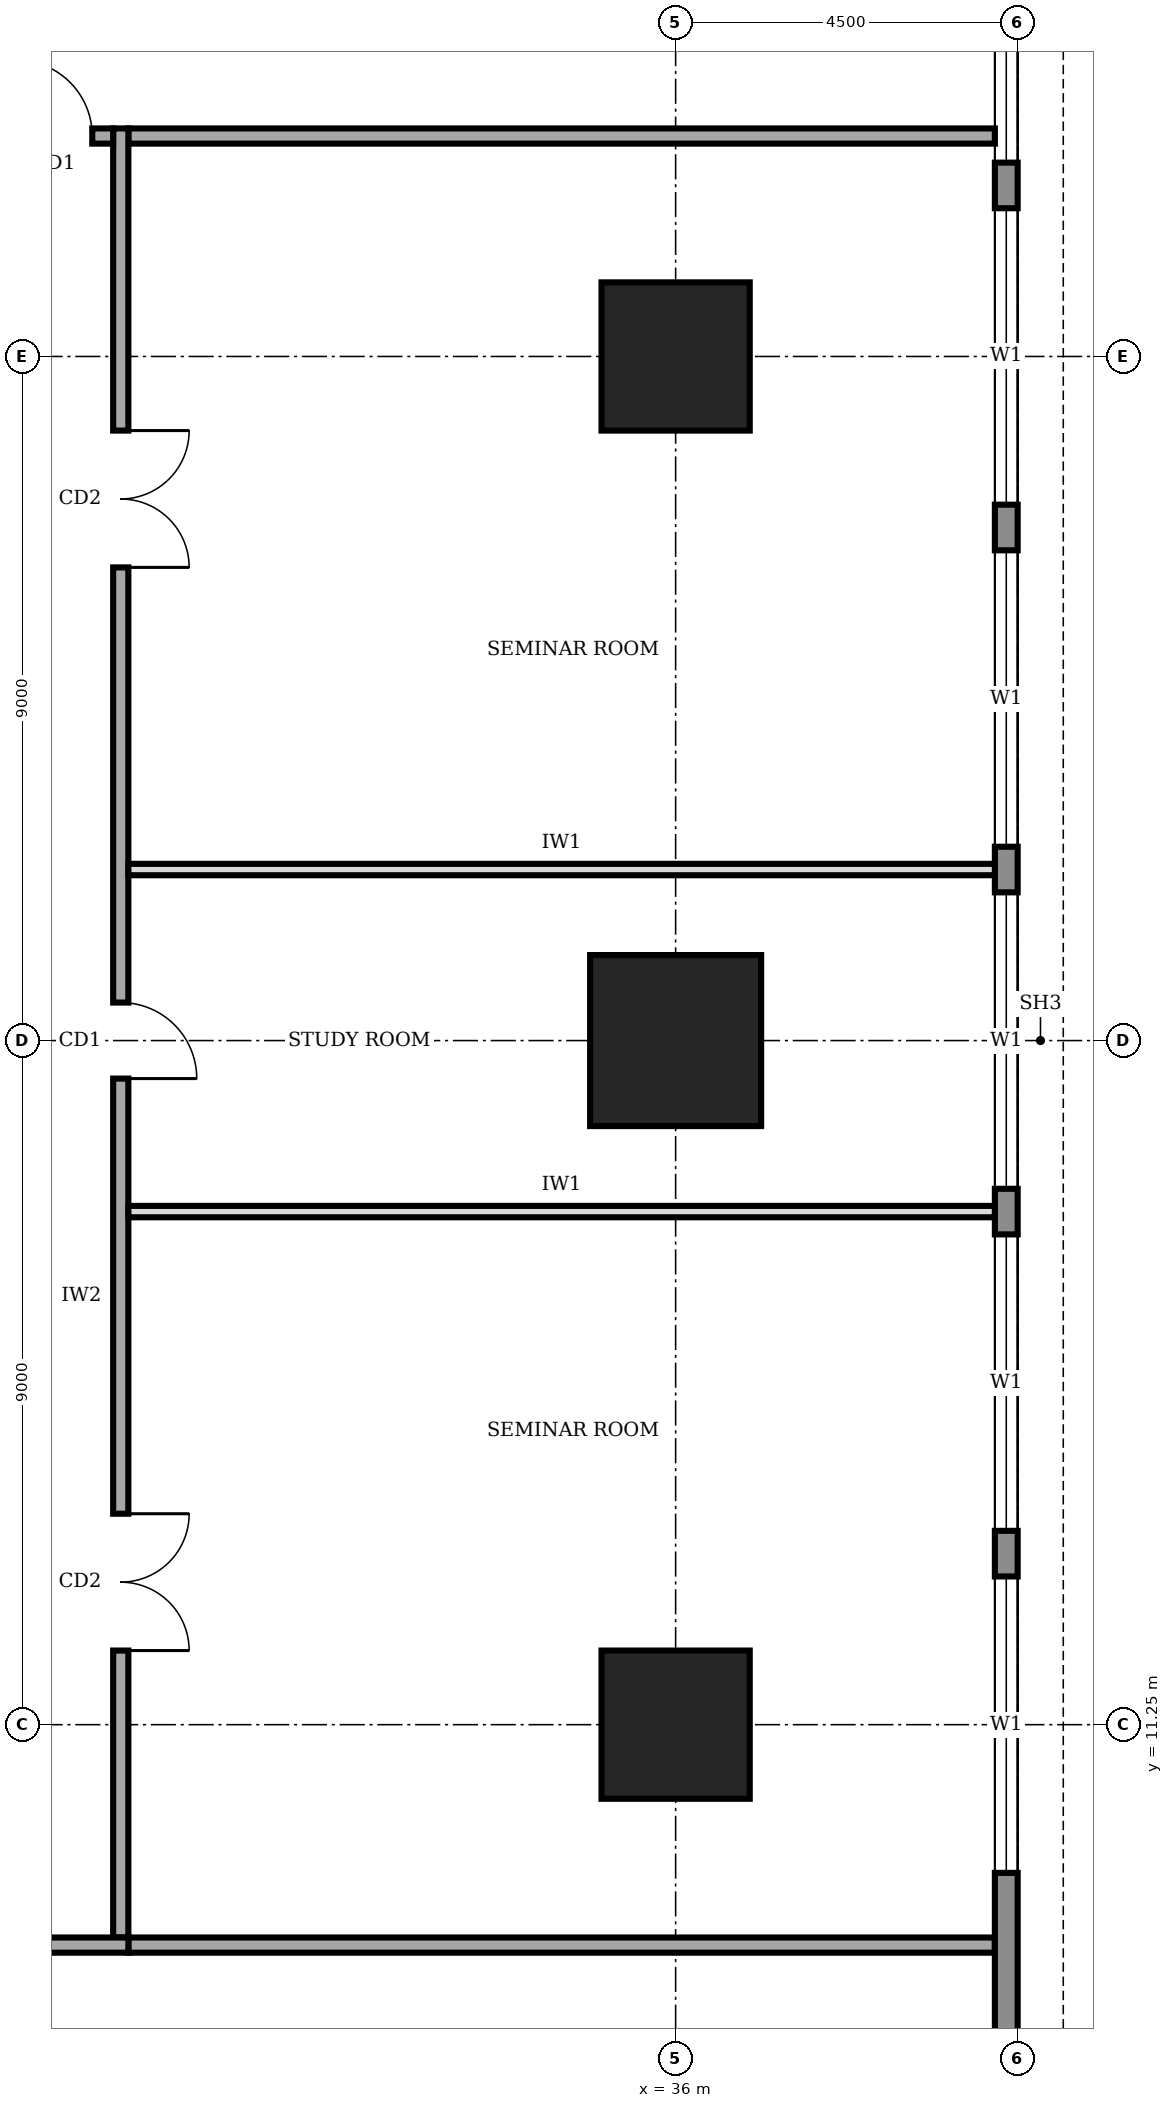
"""IFC4 building model, lengths in metres.
Left out: names, types, materials, properties, quantities, classifications, styles, units other than length and angle.
Written with IfcOpenShell. Run it as: python <this file> out.ifc"""

import sys

from ifc_helpers import new_model, si_unit, direction, frame, frame_2d, origin, origin_2d, place, context, subcontext, project, spatial, rectangle, extrude, element, fill, save


model = new_model("IFC4")
c1 = context("Model", 3, precision=1e-05, world=origin(), true_north=direction((0.0, 1.0)))
c2 = subcontext(c1, "Body", "Model", "MODEL_VIEW")
j1 = project(units=[si_unit("LENGTHUNIT", "METRE"), si_unit("PLANEANGLEUNIT", "RADIAN")], contexts=[c1])
p1 = place(None, origin())
s1 = spatial("IfcSite", under=j1, at=p1, CompositionType="ELEMENT")
p2 = place(p1, origin())
s2 = spatial("IfcBuilding", under=s1, at=p2, CompositionType="ELEMENT")
p3 = place(p2, frame((0.0, 0.0, 217.0)))
s3 = spatial("IfcBuildingStorey", under=s2, at=p3, CompositionType="ELEMENT", Elevation=217.0)
p4 = place(p3, frame((36.0, 11.25, 0.0), z_axis=(0.0, 0.0, 1.0), x_axis=(1.0, 0.0, 0.0)))
e1 = element("IfcColumn", 1, at=p4, inside=s3, PredefinedType="COLUMN", context=c2, shape_type="SweptSolid", body=[
    extrude(rectangle(XDim=1.95, YDim=1.95, at=origin_2d()), origin(), (0.0, 0.0, 1.0), 4.0),
])
p5 = place(p3, frame((36.0, 20.25, 0.0), z_axis=(0.0, 0.0, 1.0), x_axis=(1.0, 0.0, 0.0)))
e2 = element("IfcColumn", 2, at=p5, inside=s3, PredefinedType="COLUMN", context=c2, shape_type="SweptSolid", body=[
    extrude(rectangle(XDim=2.25, YDim=2.25, at=origin_2d()), origin(), (0.0, 0.0, 1.0), 4.0),
])
p6 = place(p3, frame((36.0, 29.25, 0.0), z_axis=(0.0, 0.0, 1.0), x_axis=(1.0, 0.0, 0.0)))
e3 = element("IfcColumn", 3, at=p6, inside=s3, PredefinedType="COLUMN", context=c2, shape_type="SweptSolid", body=[
    extrude(rectangle(XDim=1.95, YDim=1.95, at=origin_2d()), origin(), (0.0, 0.0, 1.0), 4.0),
])
p7 = place(p3, frame((40.35, 4.52, 0.0), z_axis=(0.0, 0.0, 1.0), x_axis=(0.0, 1.0, 0.0)))
e4 = element("IfcWall", 4, at=p7, inside=s3, PredefinedType="STANDARD", context=c2, shape_type="SweptSolid", body=[
    extrude(rectangle(XDim=31.46, YDim=0.3, at=frame_2d((15.73, 0.0))), origin(), (0.0, 0.0, 1.0), 3.75),
])
p8 = place(p7, frame((4.78, 0.0, 0.9)))
e5 = element("IfcOpeningElement", 5, at=p8, cuts=e4, PredefinedType="OPENING", context=c2, shape_type="SweptSolid", body=[
    extrude(rectangle(XDim=3.9, YDim=2.2, at=frame_2d((1.95, 1.1))), frame((0.0, 0.16, 0.0), z_axis=(0.0, -1.0, 0.0), x_axis=(1.0, 0.0, 0.0)), (0.0, 0.0, 1.0), 0.32),
])
p9 = place(p7, frame((9.28, 0.0, 0.9)))
e6 = element("IfcOpeningElement", 6, at=p9, cuts=e4, PredefinedType="OPENING", context=c2, shape_type="SweptSolid", body=[
    extrude(rectangle(XDim=3.9, YDim=2.2, at=frame_2d((1.95, 1.1))), frame((0.0, 0.16, 0.0), z_axis=(0.0, -1.0, 0.0), x_axis=(1.0, 0.0, 0.0)), (0.0, 0.0, 1.0), 0.32),
])
p10 = place(p7, frame((13.78, 0.0, 0.9)))
e7 = element("IfcOpeningElement", 7, at=p10, cuts=e4, PredefinedType="OPENING", context=c2, shape_type="SweptSolid", body=[
    extrude(rectangle(XDim=3.9, YDim=2.2, at=frame_2d((1.95, 1.1))), frame((0.0, 0.16, 0.0), z_axis=(0.0, -1.0, 0.0), x_axis=(1.0, 0.0, 0.0)), (0.0, 0.0, 1.0), 0.32),
])
p11 = place(p7, frame((18.28, 0.0, 0.9)))
e8 = element("IfcOpeningElement", 8, at=p11, cuts=e4, PredefinedType="OPENING", context=c2, shape_type="SweptSolid", body=[
    extrude(rectangle(XDim=3.9, YDim=2.2, at=frame_2d((1.95, 1.1))), frame((0.0, 0.16, 0.0), z_axis=(0.0, -1.0, 0.0), x_axis=(1.0, 0.0, 0.0)), (0.0, 0.0, 1.0), 0.32),
])
p12 = place(p7, frame((22.78, 0.0, 0.9)))
e9 = element("IfcOpeningElement", 9, at=p12, cuts=e4, PredefinedType="OPENING", context=c2, shape_type="SweptSolid", body=[
    extrude(rectangle(XDim=3.9, YDim=2.2, at=frame_2d((1.95, 1.1))), frame((0.0, 0.16, 0.0), z_axis=(0.0, -1.0, 0.0), x_axis=(1.0, 0.0, 0.0)), (0.0, 0.0, 1.0), 0.32),
])
p13 = place(p7, frame((27.28, 0.0, 0.9)))
e10 = element("IfcOpeningElement", 10, at=p13, cuts=e4, PredefinedType="OPENING", context=c2, shape_type="SweptSolid", body=[
    extrude(rectangle(XDim=3.9, YDim=2.2, at=frame_2d((1.95, 1.1))), frame((0.0, 0.16, 0.0), z_axis=(0.0, -1.0, 0.0), x_axis=(1.0, 0.0, 0.0)), (0.0, 0.0, 1.0), 0.32),
])
p14 = place(p3, frame((11.9, 8.35, 0.0), z_axis=(0.0, 0.0, 1.0), x_axis=(1.0, 0.0, 0.0)))
e11 = element("IfcWall", 11, at=p14, inside=s3, PredefinedType="SOLIDWALL", context=c2, shape_type="SweptSolid", body=[
    extrude(rectangle(XDim=16.9, YDim=0.2, at=frame_2d((8.45, 0.0))), origin(), (0.0, 0.0, 1.0), 3.75),
])
p15 = place(p14, frame((2.05, 0.0, 0.0)))
e12 = element("IfcOpeningElement", 12, at=p15, cuts=e11, PredefinedType="OPENING", context=c2, shape_type="SweptSolid", body=[
    extrude(rectangle(XDim=1.8, YDim=2.1, at=frame_2d((0.9, 1.05))), frame((0.0, 0.11, 0.0), z_axis=(0.0, -1.0, 0.0), x_axis=(1.0, 0.0, 0.0)), (0.0, 0.0, 1.0), 0.22),
])
p16 = place(p14, frame((10.6, 0.0, 0.0)))
e13 = element("IfcOpeningElement", 13, at=p16, cuts=e11, PredefinedType="OPENING", context=c2, shape_type="SweptSolid", body=[
    extrude(rectangle(XDim=1.8, YDim=2.1, at=frame_2d((0.9, 1.05))), frame((0.0, 0.11, 0.0), z_axis=(0.0, -1.0, 0.0), x_axis=(1.0, 0.0, 0.0)), (0.0, 0.0, 1.0), 0.22),
])
p17 = place(p3, frame((28.7, 8.45, 0.0), z_axis=(0.0, 0.0, 1.0), x_axis=(0.0, 1.0, 0.0)))
e14 = element("IfcWall", 14, at=p17, inside=s3, PredefinedType="SOLIDWALL", context=c2, shape_type="SweptSolid", body=[
    extrude(rectangle(XDim=23.8, YDim=0.2, at=frame_2d((11.9, 0.0))), origin(), (0.0, 0.0, 1.0), 3.75),
])
p18 = place(p17, frame((3.775, 0.0, 0.0)))
e15 = element("IfcOpeningElement", 15, at=p18, cuts=e14, PredefinedType="OPENING", context=c2, shape_type="SweptSolid", body=[
    extrude(rectangle(XDim=1.8, YDim=2.1, at=frame_2d((0.9, 1.05))), frame((0.0, 0.11, 0.0), z_axis=(0.0, -1.0, 0.0), x_axis=(1.0, 0.0, 0.0)), (0.0, 0.0, 1.0), 0.22),
])
p19 = place(p17, frame((11.3, 0.0, 0.0)))
e16 = element("IfcOpeningElement", 16, at=p19, cuts=e14, PredefinedType="OPENING", context=c2, shape_type="SweptSolid", body=[
    extrude(rectangle(XDim=1.0, YDim=2.1, at=frame_2d((0.5, 1.05))), frame((0.0, 0.11, 0.0), z_axis=(0.0, -1.0, 0.0), x_axis=(1.0, 0.0, 0.0)), (0.0, 0.0, 1.0), 0.22),
])
p20 = place(p17, frame((18.025, 0.0, 0.0)))
e17 = element("IfcOpeningElement", 17, at=p20, cuts=e14, PredefinedType="OPENING", context=c2, shape_type="SweptSolid", body=[
    extrude(rectangle(XDim=1.8, YDim=2.1, at=frame_2d((0.9, 1.05))), frame((0.0, 0.11, 0.0), z_axis=(0.0, -1.0, 0.0), x_axis=(1.0, 0.0, 0.0)), (0.0, 0.0, 1.0), 0.22),
])
p21 = place(p3, frame((28.6, 32.15, 0.0), z_axis=(0.0, 0.0, 1.0), x_axis=(-1.0, 0.0, 0.0)))
e18 = element("IfcWall", 18, at=p21, inside=s3, PredefinedType="SOLIDWALL", context=c2, shape_type="SweptSolid", body=[
    extrude(rectangle(XDim=16.9, YDim=0.2, at=frame_2d((8.45, 0.0))), origin(), (0.0, 0.0, 1.0), 3.75),
])
p22 = place(p21, frame((15.425, 0.0, 0.0)))
e19 = element("IfcOpeningElement", 19, at=p22, cuts=e18, PredefinedType="OPENING", context=c2, shape_type="SweptSolid", body=[
    extrude(rectangle(XDim=1.0, YDim=2.1, at=frame_2d((0.5, 1.05))), frame((0.0, 0.11, 0.0), z_axis=(0.0, -1.0, 0.0), x_axis=(1.0, 0.0, 0.0)), (0.0, 0.0, 1.0), 0.22),
])
p23 = place(p21, frame((12.35, 0.0, 0.0)))
e20 = element("IfcOpeningElement", 20, at=p23, cuts=e18, PredefinedType="OPENING", context=c2, shape_type="SweptSolid", body=[
    extrude(rectangle(XDim=1.0, YDim=2.1, at=frame_2d((0.5, 1.05))), frame((0.0, 0.11, 0.0), z_axis=(0.0, -1.0, 0.0), x_axis=(1.0, 0.0, 0.0)), (0.0, 0.0, 1.0), 0.22),
])
p24 = place(p21, frame((5.6, 0.0, 0.0)))
e21 = element("IfcOpeningElement", 21, at=p24, cuts=e18, PredefinedType="OPENING", context=c2, shape_type="SweptSolid", body=[
    extrude(rectangle(XDim=1.0, YDim=2.1, at=frame_2d((0.5, 1.05))), frame((0.0, 0.11, 0.0), z_axis=(0.0, -1.0, 0.0), x_axis=(1.0, 0.0, 0.0)), (0.0, 0.0, 1.0), 0.22),
])
p25 = place(p21, frame((0.275, 0.0, 0.0)))
e22 = element("IfcOpeningElement", 22, at=p25, cuts=e18, PredefinedType="OPENING", context=c2, shape_type="SweptSolid", body=[
    extrude(rectangle(XDim=1.0, YDim=2.1, at=frame_2d((0.5, 1.05))), frame((0.0, 0.11, 0.0), z_axis=(0.0, -1.0, 0.0), x_axis=(1.0, 0.0, 0.0)), (0.0, 0.0, 1.0), 0.22),
])
for number, where, z_axis, x_axis in (
    (23, (28.8, 8.35, 0.0), (0.0, 0.0, 1.0), (1.0, 0.0, 0.0)),
    (24, (28.8, 32.15, 0.0), (0.0, 0.0, 1.0), (1.0, 0.0, 0.0)),
):
    element("IfcWall", number, at=place(p3, frame(where, z_axis=z_axis, x_axis=x_axis)), inside=s3, PredefinedType="SOLIDWALL", context=c2, shape_type="SweptSolid", body=[
        extrude(rectangle(XDim=11.4, YDim=0.2, at=frame_2d((5.7, 0.0))), origin(), (0.0, 0.0, 1.0), 3.75),
    ])
for number, where, z_axis, x_axis in (
    (25, (28.8, 18.0, 0.0), (0.0, 0.0, 1.0), (1.0, 0.0, 0.0)),
    (26, (28.8, 22.5, 0.0), (0.0, 0.0, 1.0), (1.0, 0.0, 0.0)),
):
    element("IfcWall", number, at=place(p3, frame(where, z_axis=z_axis, x_axis=x_axis)), inside=s3, PredefinedType="PARTITIONING", context=c2, shape_type="SweptSolid", body=[
        extrude(rectangle(XDim=11.4, YDim=0.15, at=frame_2d((5.7, 0.0))), origin(), (0.0, 0.0, 1.0), 3.75),
    ])
p26 = place(p8, origin())
e27 = element("IfcWindow", 27, at=p26, inside=s3, PartitioningType="SINGLE_PANEL", PredefinedType="WINDOW", context=c2, shape_type="SweptSolid", body=[
    extrude(rectangle(XDim=3.9, YDim=2.2, at=frame_2d((1.95, 1.1))), frame((0.0, 0.03, 0.0), z_axis=(0.0, -1.0, 0.0), x_axis=(1.0, 0.0, 0.0)), (0.0, 0.0, 1.0), 0.06),
])
fill(e5, e27)
p27 = place(p9, origin())
e28 = element("IfcWindow", 28, at=p27, inside=s3, PartitioningType="SINGLE_PANEL", PredefinedType="WINDOW", context=c2, shape_type="SweptSolid", body=[
    extrude(rectangle(XDim=3.9, YDim=2.2, at=frame_2d((1.95, 1.1))), frame((0.0, 0.03, 0.0), z_axis=(0.0, -1.0, 0.0), x_axis=(1.0, 0.0, 0.0)), (0.0, 0.0, 1.0), 0.06),
])
fill(e6, e28)
p28 = place(p10, origin())
e29 = element("IfcWindow", 29, at=p28, inside=s3, PartitioningType="SINGLE_PANEL", PredefinedType="WINDOW", context=c2, shape_type="SweptSolid", body=[
    extrude(rectangle(XDim=3.9, YDim=2.2, at=frame_2d((1.95, 1.1))), frame((0.0, 0.03, 0.0), z_axis=(0.0, -1.0, 0.0), x_axis=(1.0, 0.0, 0.0)), (0.0, 0.0, 1.0), 0.06),
])
fill(e7, e29)
p29 = place(p11, origin())
e30 = element("IfcWindow", 30, at=p29, inside=s3, PartitioningType="SINGLE_PANEL", PredefinedType="WINDOW", context=c2, shape_type="SweptSolid", body=[
    extrude(rectangle(XDim=3.9, YDim=2.2, at=frame_2d((1.95, 1.1))), frame((0.0, 0.03, 0.0), z_axis=(0.0, -1.0, 0.0), x_axis=(1.0, 0.0, 0.0)), (0.0, 0.0, 1.0), 0.06),
])
fill(e8, e30)
p30 = place(p12, origin())
e31 = element("IfcWindow", 31, at=p30, inside=s3, PartitioningType="SINGLE_PANEL", PredefinedType="WINDOW", context=c2, shape_type="SweptSolid", body=[
    extrude(rectangle(XDim=3.9, YDim=2.2, at=frame_2d((1.95, 1.1))), frame((0.0, 0.03, 0.0), z_axis=(0.0, -1.0, 0.0), x_axis=(1.0, 0.0, 0.0)), (0.0, 0.0, 1.0), 0.06),
])
fill(e9, e31)
p31 = place(p13, origin())
e32 = element("IfcWindow", 32, at=p31, inside=s3, PartitioningType="SINGLE_PANEL", PredefinedType="WINDOW", context=c2, shape_type="SweptSolid", body=[
    extrude(rectangle(XDim=3.9, YDim=2.2, at=frame_2d((1.95, 1.1))), frame((0.0, 0.03, 0.0), z_axis=(0.0, -1.0, 0.0), x_axis=(1.0, 0.0, 0.0)), (0.0, 0.0, 1.0), 0.06),
])
fill(e10, e32)
p32 = place(p18, frame((1.8, 0.0, 0.0), z_axis=(0.0, 0.0, 1.0), x_axis=(-1.0, 0.0, 0.0)))
e33 = element("IfcDoor", 33, at=p32, inside=s3, OperationType="DOUBLE_DOOR_SINGLE_SWING", PredefinedType="DOOR", context=c2, shape_type="SweptSolid", body=[
    extrude(rectangle(XDim=1.8, YDim=2.1, at=frame_2d((0.9, 1.05))), frame((0.0, 0.025, 0.0), z_axis=(0.0, -1.0, 0.0), x_axis=(1.0, 0.0, 0.0)), (0.0, 0.0, 1.0), 0.05),
])
fill(e15, e33)
p33 = place(p19, frame((1.0, 0.0, 0.0), z_axis=(0.0, 0.0, 1.0), x_axis=(-1.0, 0.0, 0.0)))
e34 = element("IfcDoor", 34, at=p33, inside=s3, OperationType="SINGLE_SWING_RIGHT", PredefinedType="DOOR", context=c2, shape_type="SweptSolid", body=[
    extrude(rectangle(XDim=1.0, YDim=2.1, at=frame_2d((0.5, 1.05))), frame((0.0, 0.025, 0.0), z_axis=(0.0, -1.0, 0.0), x_axis=(1.0, 0.0, 0.0)), (0.0, 0.0, 1.0), 0.05),
])
fill(e16, e34)
p34 = place(p20, frame((1.8, 0.0, 0.0), z_axis=(0.0, 0.0, 1.0), x_axis=(-1.0, 0.0, 0.0)))
e35 = element("IfcDoor", 35, at=p34, inside=s3, OperationType="DOUBLE_DOOR_SINGLE_SWING", PredefinedType="DOOR", context=c2, shape_type="SweptSolid", body=[
    extrude(rectangle(XDim=1.8, YDim=2.1, at=frame_2d((0.9, 1.05))), frame((0.0, 0.025, 0.0), z_axis=(0.0, -1.0, 0.0), x_axis=(1.0, 0.0, 0.0)), (0.0, 0.0, 1.0), 0.05),
])
fill(e17, e35)
p35 = place(p25, frame((1.0, 0.0, 0.0), z_axis=(0.0, 0.0, 1.0), x_axis=(-1.0, 0.0, 0.0)))
e36 = element("IfcDoor", 36, at=p35, inside=s3, OperationType="SINGLE_SWING_LEFT", PredefinedType="DOOR", context=c2, shape_type="SweptSolid", body=[
    extrude(rectangle(XDim=1.0, YDim=2.1, at=frame_2d((0.5, 1.05))), frame((0.0, 0.025, 0.0), z_axis=(0.0, -1.0, 0.0), x_axis=(1.0, 0.0, 0.0)), (0.0, 0.0, 1.0), 0.05),
])
fill(e22, e36)
save(model, sys.argv[1])
